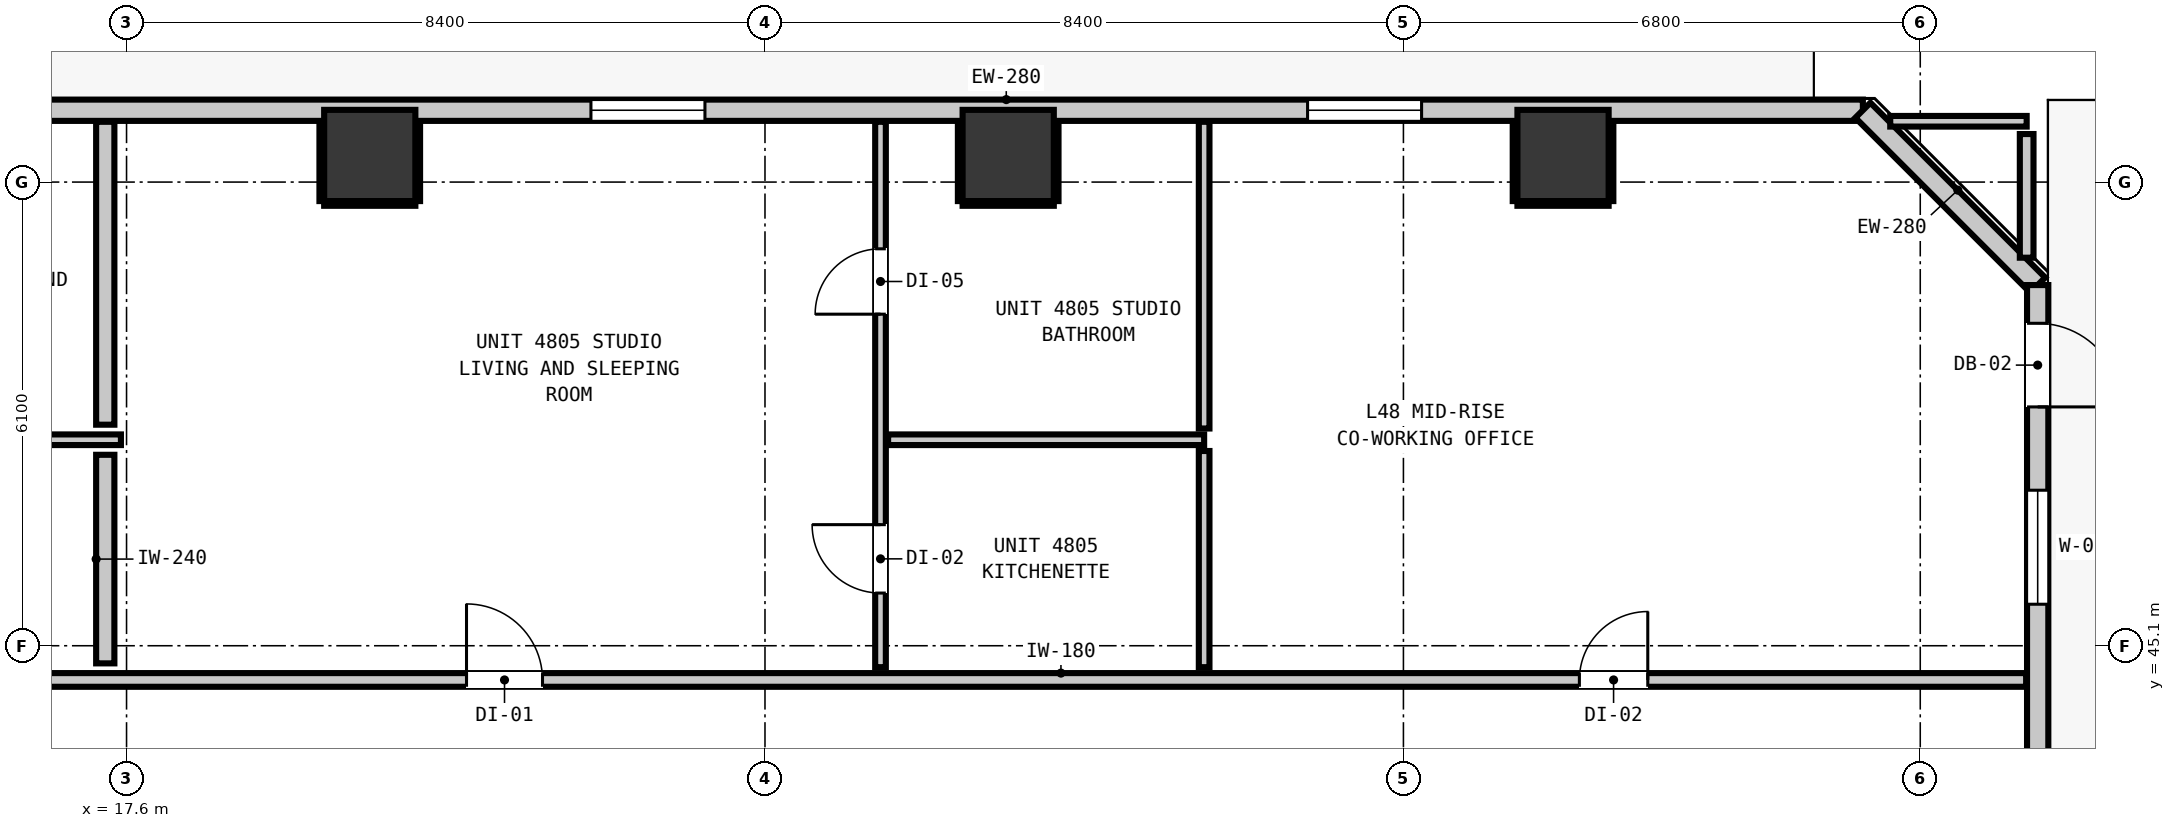
"""IFC4 building model, lengths in metres.
Left out: names, types, materials, properties, quantities, classifications, styles, units other than length and angle.
Written with IfcOpenShell. Run it as: python <this file> out.ifc"""

import sys

from ifc_helpers import new_model, si_unit, direction, frame, frame_2d, origin, origin_2d, place, context, subcontext, project, spatial, rectangle, extrude, element, fill, save


model = new_model("IFC4")
c1 = context("Model", 3, precision=1e-05, world=origin(), true_north=direction((0.0, 1.0)))
c2 = subcontext(c1, "Body", "Model", "MODEL_VIEW")
j1 = project(units=[si_unit("LENGTHUNIT", "METRE"), si_unit("PLANEANGLEUNIT", "RADIAN")], contexts=[c1])
p1 = place(None, origin())
s1 = spatial("IfcSite", under=j1, at=p1, CompositionType="ELEMENT")
p2 = place(p1, origin())
s2 = spatial("IfcBuilding", under=s1, at=p2, CompositionType="ELEMENT")
p3 = place(p2, frame((0.0, 0.0, 165.84)))
s3 = spatial("IfcBuildingStorey", under=s2, at=p3, CompositionType="ELEMENT", Elevation=165.84)
for number, where, z_axis, x_axis in (
    (1, (20.8, 51.55, -0.2), (0.0, 0.0, 1.0), (1.0, 0.0, 0.0)),
    (2, (29.2, 51.55, -0.2), (0.0, 0.0, 1.0), (1.0, 0.0, 0.0)),
    (3, (36.5, 51.55, -0.2), (0.0, 0.0, 1.0), (1.0, 0.0, 0.0)),
):
    element("IfcColumn", number, at=place(p3, frame(where, z_axis=z_axis, x_axis=x_axis)), inside=s3, PredefinedType="COLUMN", context=c2, shape_type="SweptSolid", body=[
        extrude(rectangle(XDim=1.2, YDim=1.2, at=origin_2d()), origin(), (0.0, 0.0, 1.0), 3.52),
    ])
p4 = place(p3, frame((5.355, 52.145, 0.0), z_axis=(0.0, 0.0, 1.0), x_axis=(1.0, 0.0, 0.0)))
e4 = element("IfcWall", 4, at=p4, inside=s3, PredefinedType="STANDARD", context=c2, shape_type="SweptSolid", body=[
    extrude(rectangle(XDim=35.09, YDim=0.28, at=frame_2d((17.545, 0.0))), origin(), (0.0, 0.0, 1.0), 3.08),
])
p5 = place(p4, frame((2.658, 0.0, 0.0)))
e5 = element("IfcOpeningElement", 5, at=p5, cuts=e4, PredefinedType="OPENING", context=c2, shape_type="SweptSolid", body=[
    extrude(rectangle(XDim=1.0, YDim=2.15, at=frame_2d((0.5, 1.075))), frame((0.0, 0.15, 0.0), z_axis=(0.0, -1.0, 0.0), x_axis=(1.0, 0.0, 0.0)), (0.0, 0.0, 1.0), 0.3),
])
p6 = place(p4, frame((4.362, 0.0, 0.85)))
e6 = element("IfcOpeningElement", 6, at=p6, cuts=e4, PredefinedType="OPENING", context=c2, shape_type="SweptSolid", body=[
    extrude(rectangle(XDim=1.5, YDim=1.8, at=frame_2d((0.75, 0.9))), frame((0.0, 0.15, 0.0), z_axis=(0.0, -1.0, 0.0), x_axis=(1.0, 0.0, 0.0)), (0.0, 0.0, 1.0), 0.3),
])
p7 = place(p4, frame((0.316, 0.0, 0.85)))
e7 = element("IfcOpeningElement", 7, at=p7, cuts=e4, PredefinedType="OPENING", context=c2, shape_type="SweptSolid", body=[
    extrude(rectangle(XDim=1.5, YDim=1.8, at=frame_2d((0.75, 0.9))), frame((0.0, 0.15, 0.0), z_axis=(0.0, -1.0, 0.0), x_axis=(1.0, 0.0, 0.0)), (0.0, 0.0, 1.0), 0.3),
])
p8 = place(p4, frame((9.608, 0.0, 0.85)))
e8 = element("IfcOpeningElement", 8, at=p8, cuts=e4, PredefinedType="OPENING", context=c2, shape_type="SweptSolid", body=[
    extrude(rectangle(XDim=1.5, YDim=1.8, at=frame_2d((0.75, 0.9))), frame((0.0, 0.15, 0.0), z_axis=(0.0, -1.0, 0.0), x_axis=(1.0, 0.0, 0.0)), (0.0, 0.0, 1.0), 0.3),
])
p9 = place(p4, frame((18.355, 0.0, 0.85)))
e9 = element("IfcOpeningElement", 9, at=p9, cuts=e4, PredefinedType="OPENING", context=c2, shape_type="SweptSolid", body=[
    extrude(rectangle(XDim=1.5, YDim=1.8, at=frame_2d((0.75, 0.9))), frame((0.0, 0.15, 0.0), z_axis=(0.0, -1.0, 0.0), x_axis=(1.0, 0.0, 0.0)), (0.0, 0.0, 1.0), 0.3),
])
p10 = place(p4, frame((27.784, 0.0, 0.85)))
e10 = element("IfcOpeningElement", 10, at=p10, cuts=e4, PredefinedType="OPENING", context=c2, shape_type="SweptSolid", body=[
    extrude(rectangle(XDim=1.5, YDim=1.8, at=frame_2d((0.75, 0.9))), frame((0.0, 0.15, 0.0), z_axis=(0.0, -1.0, 0.0), x_axis=(1.0, 0.0, 0.0)), (0.0, 0.0, 1.0), 0.3),
])
p11 = place(p3, frame((40.445, 52.145, 0.0), z_axis=(0.0, 0.0, 1.0), x_axis=(0.707106781187, -0.707106781187, 0.0)))
e11 = element("IfcWall", 11, at=p11, inside=s3, PredefinedType="STANDARD", context=c2, shape_type="SweptSolid", body=[
    extrude(rectangle(XDim=3.253, YDim=0.28, at=frame_2d((1.626, 0.0))), origin(), (0.0, 0.0, 1.0), 3.08),
])
p12 = place(p3, frame((42.745, 49.845, 0.0), z_axis=(0.0, 0.0, 1.0), x_axis=(0.0, -1.0, 0.0)))
e12 = element("IfcWall", 12, at=p12, inside=s3, PredefinedType="STANDARD", context=c2, shape_type="SweptSolid", body=[
    extrude(rectangle(XDim=32.29, YDim=0.28, at=frame_2d((16.145, 0.0))), origin(), (0.0, 0.0, 1.0), 3.08),
])
p13 = place(p12, frame((0.503, 0.0, 0.0)))
e13 = element("IfcOpeningElement", 13, at=p13, cuts=e12, PredefinedType="OPENING", context=c2, shape_type="SweptSolid", body=[
    extrude(rectangle(XDim=1.1, YDim=2.15, at=frame_2d((0.55, 1.075))), frame((0.0, 0.15, 0.0), z_axis=(0.0, -1.0, 0.0), x_axis=(1.0, 0.0, 0.0)), (0.0, 0.0, 1.0), 0.3),
])
p14 = place(p12, frame((2.699, 0.0, 0.85)))
e14 = element("IfcOpeningElement", 14, at=p14, cuts=e12, PredefinedType="OPENING", context=c2, shape_type="SweptSolid", body=[
    extrude(rectangle(XDim=1.5, YDim=1.8, at=frame_2d((0.75, 0.9))), frame((0.0, 0.15, 0.0), z_axis=(0.0, -1.0, 0.0), x_axis=(1.0, 0.0, 0.0)), (0.0, 0.0, 1.0), 0.3),
])
p15 = place(p12, frame((23.17, 0.0, 0.85)))
e15 = element("IfcOpeningElement", 15, at=p15, cuts=e12, PredefinedType="OPENING", context=c2, shape_type="SweptSolid", body=[
    extrude(rectangle(XDim=1.5, YDim=1.8, at=frame_2d((0.75, 0.9))), frame((0.0, 0.15, 0.0), z_axis=(0.0, -1.0, 0.0), x_axis=(1.0, 0.0, 0.0)), (0.0, 0.0, 1.0), 0.3),
])
p16 = place(p12, frame((13.62, 0.0, 0.85)))
e16 = element("IfcOpeningElement", 16, at=p16, cuts=e12, PredefinedType="OPENING", context=c2, shape_type="SweptSolid", body=[
    extrude(rectangle(XDim=1.5, YDim=1.8, at=frame_2d((0.75, 0.9))), frame((0.0, 0.15, 0.0), z_axis=(0.0, -1.0, 0.0), x_axis=(1.0, 0.0, 0.0)), (0.0, 0.0, 1.0), 0.3),
])
p17 = place(p3, frame((3.207, 44.65, 0.0), z_axis=(0.0, 0.0, 1.0), x_axis=(1.0, 0.0, 0.0)))
e17 = element("IfcWall", 17, at=p17, inside=s3, PredefinedType="PARTITIONING", context=c2, shape_type="SweptSolid", body=[
    extrude(rectangle(XDim=39.386, YDim=0.18, at=frame_2d((19.693, 0.0))), origin(), (0.0, 0.0, 1.0), 3.08),
])
p18 = place(p17, frame((5.952, 0.0, 0.0)))
e18 = element("IfcOpeningElement", 18, at=p18, cuts=e17, PredefinedType="OPENING", context=c2, shape_type="SweptSolid", body=[
    extrude(rectangle(XDim=1.0, YDim=2.15, at=frame_2d((0.5, 1.075))), frame((0.0, 0.1, 0.0), z_axis=(0.0, -1.0, 0.0), x_axis=(1.0, 0.0, 0.0)), (0.0, 0.0, 1.0), 0.2),
])
p19 = place(p17, frame((18.866, 0.0, 0.0)))
e19 = element("IfcOpeningElement", 19, at=p19, cuts=e17, PredefinedType="OPENING", context=c2, shape_type="SweptSolid", body=[
    extrude(rectangle(XDim=1.0, YDim=2.15, at=frame_2d((0.5, 1.075))), frame((0.0, 0.1, 0.0), z_axis=(0.0, -1.0, 0.0), x_axis=(1.0, 0.0, 0.0)), (0.0, 0.0, 1.0), 0.2),
])
p20 = place(p17, frame((33.508, 0.0, 0.0)))
e20 = element("IfcOpeningElement", 20, at=p20, cuts=e17, PredefinedType="OPENING", context=c2, shape_type="SweptSolid", body=[
    extrude(rectangle(XDim=0.9, YDim=2.1, at=frame_2d((0.45, 1.05))), frame((0.0, 0.1, 0.0), z_axis=(0.0, -1.0, 0.0), x_axis=(1.0, 0.0, 0.0)), (0.0, 0.0, 1.0), 0.2),
])
p21 = place(p3, frame((11.82, 47.81, 0.0), z_axis=(0.0, 0.0, 1.0), x_axis=(1.0, 0.0, 0.0)))
e21 = element("IfcWall", 21, at=p21, inside=s3, PredefinedType="PARTITIONING", context=c2, shape_type="SweptSolid", body=[
    extrude(rectangle(XDim=5.706, YDim=0.14, at=frame_2d((2.853, 0.0))), origin(), (0.0, 0.0, 1.0), 3.08),
])
p22 = place(p3, frame((27.62, 47.81, 0.0), z_axis=(0.0, 0.0, 1.0), x_axis=(1.0, 0.0, 0.0)))
e22 = element("IfcWall", 22, at=p22, inside=s3, PredefinedType="PARTITIONING", context=c2, shape_type="SweptSolid", body=[
    extrude(rectangle(XDim=4.158, YDim=0.14, at=frame_2d((2.079, 0.0))), origin(), (0.0, 0.0, 1.0), 3.08),
])
p23 = place(p3, frame((40.805, 52.0, 0.0), z_axis=(0.0, 0.0, 1.0), x_axis=(1.0, 0.0, 0.0)))
e23 = element("IfcWall", 23, at=p23, inside=s3, PredefinedType="PARTITIONING", context=c2, shape_type="SweptSolid", body=[
    extrude(rectangle(XDim=1.795, YDim=0.14, at=frame_2d((0.897, 0.0))), origin(), (0.0, 0.0, 1.0), 3.08),
])
p24 = place(p3, frame((17.32, 44.868, 0.0), z_axis=(0.0, 0.0, 1.0), x_axis=(0.0, 1.0, 0.0)))
e24 = element("IfcWall", 24, at=p24, inside=s3, PredefinedType="PARTITIONING", context=c2, shape_type="SweptSolid", body=[
    extrude(rectangle(XDim=2.744, YDim=0.24, at=frame_2d((1.372, 0.0))), origin(), (0.0, 0.0, 1.0), 3.08),
])
p25 = place(p3, frame((17.32, 48.008, 0.0), z_axis=(0.0, 0.0, 1.0), x_axis=(0.0, 1.0, 0.0)))
e25 = element("IfcWall", 25, at=p25, inside=s3, PredefinedType="PARTITIONING", context=c2, shape_type="SweptSolid", body=[
    extrude(rectangle(XDim=3.985, YDim=0.24, at=frame_2d((1.992, 0.0))), origin(), (0.0, 0.0, 1.0), 3.08),
])
p26 = place(p3, frame((42.6, 50.205, 0.0), z_axis=(0.0, 0.0, 1.0), x_axis=(0.0, 1.0, 0.0)))
e26 = element("IfcWall", 26, at=p26, inside=s3, PredefinedType="PARTITIONING", context=c2, shape_type="SweptSolid", body=[
    extrude(rectangle(XDim=1.627, YDim=0.18, at=frame_2d((0.813, 0.0))), origin(), (0.0, 0.0, 1.0), 3.08),
])
p27 = place(p3, frame((27.52, 44.818, 0.0), z_axis=(0.0, 0.0, 1.0), x_axis=(0.0, 1.0, 0.0)))
e27 = element("IfcWall", 27, at=p27, inside=s3, PredefinedType="PARTITIONING", context=c2, shape_type="SweptSolid", body=[
    extrude(rectangle(XDim=7.175, YDim=0.14, at=frame_2d((3.587, 0.0))), origin(), (0.0, 0.0, 1.0), 3.08),
])
p28 = place(p27, frame((0.975, 0.0, 0.0)))
e28 = element("IfcOpeningElement", 28, at=p28, cuts=e27, PredefinedType="OPENING", context=c2, shape_type="SweptSolid", body=[
    extrude(rectangle(XDim=0.9, YDim=2.1, at=frame_2d((0.45, 1.05))), frame((0.0, 0.08, 0.0), z_axis=(0.0, -1.0, 0.0), x_axis=(1.0, 0.0, 0.0)), (0.0, 0.0, 1.0), 0.16),
])
p29 = place(p27, frame((4.644, 0.0, 0.0)))
e29 = element("IfcOpeningElement", 29, at=p29, cuts=e27, PredefinedType="OPENING", context=c2, shape_type="SweptSolid", body=[
    extrude(rectangle(XDim=0.86, YDim=2.02, at=frame_2d((0.43, 1.01))), frame((0.0, 0.08, 0.0), z_axis=(0.0, -1.0, 0.0), x_axis=(1.0, 0.0, 0.0)), (0.0, 0.0, 1.0), 0.16),
])
p30 = place(p3, frame((31.778, 44.818, 0.0), z_axis=(0.0, 0.0, 1.0), x_axis=(0.0, 1.0, 0.0)))
e30 = element("IfcWall", 30, at=p30, inside=s3, PredefinedType="PARTITIONING", context=c2, shape_type="SweptSolid", body=[
    extrude(rectangle(XDim=2.844, YDim=0.14, at=frame_2d((1.422, 0.0))), origin(), (0.0, 0.0, 1.0), 3.08),
])
p31 = place(p3, frame((31.778, 47.958, 0.0), z_axis=(0.0, 0.0, 1.0), x_axis=(0.0, 1.0, 0.0)))
e31 = element("IfcWall", 31, at=p31, inside=s3, PredefinedType="PARTITIONING", context=c2, shape_type="SweptSolid", body=[
    extrude(rectangle(XDim=4.035, YDim=0.14, at=frame_2d((2.018, 0.0))), origin(), (0.0, 0.0, 1.0), 3.08),
])
p32 = place(p3, frame((20.2, 50.918, 0.0), z_axis=(0.0, 0.0, 1.0), x_axis=(1.0, 0.0, 0.0)))
e32 = element("IfcWall", 32, at=p32, inside=s3, PredefinedType="PARTITIONING", context=c2, shape_type="SweptSolid", body=[
    extrude(rectangle(XDim=1.2, YDim=0.06, at=frame_2d((0.6, 0.0))), origin(), (0.0, 0.0, 1.0), 1.45),
])
for number, where, z_axis, x_axis in (
    (33, (20.168, 50.95, 0.0), (0.0, 0.0, 1.0), (0.0, 1.0, 0.0)),
    (34, (21.432, 50.95, 0.0), (0.0, 0.0, 1.0), (0.0, 1.0, 0.0)),
):
    element("IfcWall", number, at=place(p3, frame(where, z_axis=z_axis, x_axis=x_axis)), inside=s3, PredefinedType="PARTITIONING", context=c2, shape_type="SweptSolid", body=[
        extrude(rectangle(XDim=1.04, YDim=0.06, at=frame_2d((0.52, 0.0))), origin(), (0.0, 0.0, 1.0), 1.45),
    ])
p33 = place(p3, frame((28.6, 50.918, 0.0), z_axis=(0.0, 0.0, 1.0), x_axis=(1.0, 0.0, 0.0)))
e35 = element("IfcWall", 35, at=p33, inside=s3, PredefinedType="PARTITIONING", context=c2, shape_type="SweptSolid", body=[
    extrude(rectangle(XDim=1.2, YDim=0.06, at=frame_2d((0.6, 0.0))), origin(), (0.0, 0.0, 1.0), 1.45),
])
for number, where, z_axis, x_axis in (
    (36, (28.568, 50.95, 0.0), (0.0, 0.0, 1.0), (0.0, 1.0, 0.0)),
    (37, (29.832, 50.95, 0.0), (0.0, 0.0, 1.0), (0.0, 1.0, 0.0)),
):
    element("IfcWall", number, at=place(p3, frame(where, z_axis=z_axis, x_axis=x_axis)), inside=s3, PredefinedType="PARTITIONING", context=c2, shape_type="SweptSolid", body=[
        extrude(rectangle(XDim=1.04, YDim=0.06, at=frame_2d((0.52, 0.0))), origin(), (0.0, 0.0, 1.0), 1.45),
    ])
p34 = place(p3, frame((35.9, 50.918, 0.0), z_axis=(0.0, 0.0, 1.0), x_axis=(1.0, 0.0, 0.0)))
e38 = element("IfcWall", 38, at=p34, inside=s3, PredefinedType="PARTITIONING", context=c2, shape_type="SweptSolid", body=[
    extrude(rectangle(XDim=1.2, YDim=0.06, at=frame_2d((0.6, 0.0))), origin(), (0.0, 0.0, 1.0), 1.45),
])
for number, where, z_axis, x_axis in (
    (39, (35.868, 50.95, 0.0), (0.0, 0.0, 1.0), (0.0, 1.0, 0.0)),
    (40, (37.132, 50.95, 0.0), (0.0, 0.0, 1.0), (0.0, 1.0, 0.0)),
):
    element("IfcWall", number, at=place(p3, frame(where, z_axis=z_axis, x_axis=x_axis)), inside=s3, PredefinedType="PARTITIONING", context=c2, shape_type="SweptSolid", body=[
        extrude(rectangle(XDim=1.04, YDim=0.06, at=frame_2d((0.52, 0.0))), origin(), (0.0, 0.0, 1.0), 1.45),
    ])
p35 = place(p13, origin())
e41 = element("IfcDoor", 41, at=p35, inside=s3, OperationType="SINGLE_SWING_RIGHT", PredefinedType="DOOR", context=c2, shape_type="SweptSolid", body=[
    extrude(rectangle(XDim=1.1, YDim=2.15, at=frame_2d((0.55, 1.075))), frame((0.0, 0.025, 0.0), z_axis=(0.0, -1.0, 0.0), x_axis=(1.0, 0.0, 0.0)), (0.0, 0.0, 1.0), 0.05),
])
fill(e13, e41)
p36 = place(p9, origin())
e42 = element("IfcWindow", 42, at=p36, inside=s3, PartitioningType="SINGLE_PANEL", PredefinedType="WINDOW", context=c2, shape_type="SweptSolid", body=[
    extrude(rectangle(XDim=1.5, YDim=1.8, at=frame_2d((0.75, 0.9))), frame((0.0, 0.03, 0.0), z_axis=(0.0, -1.0, 0.0), x_axis=(1.0, 0.0, 0.0)), (0.0, 0.0, 1.0), 0.06),
])
fill(e9, e42)
p37 = place(p10, origin())
e43 = element("IfcWindow", 43, at=p37, inside=s3, PartitioningType="SINGLE_PANEL", PredefinedType="WINDOW", context=c2, shape_type="SweptSolid", body=[
    extrude(rectangle(XDim=1.5, YDim=1.8, at=frame_2d((0.75, 0.9))), frame((0.0, 0.03, 0.0), z_axis=(0.0, -1.0, 0.0), x_axis=(1.0, 0.0, 0.0)), (0.0, 0.0, 1.0), 0.06),
])
fill(e10, e43)
p38 = place(p14, origin())
e44 = element("IfcWindow", 44, at=p38, inside=s3, PartitioningType="SINGLE_PANEL", PredefinedType="WINDOW", context=c2, shape_type="SweptSolid", body=[
    extrude(rectangle(XDim=1.5, YDim=1.8, at=frame_2d((0.75, 0.9))), frame((0.0, 0.03, 0.0), z_axis=(0.0, -1.0, 0.0), x_axis=(1.0, 0.0, 0.0)), (0.0, 0.0, 1.0), 0.06),
])
fill(e14, e44)
p39 = place(p19, origin())
e45 = element("IfcDoor", 45, at=p39, inside=s3, OperationType="SINGLE_SWING_LEFT", PredefinedType="DOOR", context=c2, shape_type="SweptSolid", body=[
    extrude(rectangle(XDim=1.0, YDim=2.15, at=frame_2d((0.5, 1.075))), frame((0.0, 0.025, 0.0), z_axis=(0.0, -1.0, 0.0), x_axis=(1.0, 0.0, 0.0)), (0.0, 0.0, 1.0), 0.05),
])
fill(e19, e45)
p40 = place(p28, origin())
e46 = element("IfcDoor", 46, at=p40, inside=s3, OperationType="SINGLE_SWING_RIGHT", PredefinedType="DOOR", context=c2, shape_type="SweptSolid", body=[
    extrude(rectangle(XDim=0.9, YDim=2.1, at=frame_2d((0.45, 1.05))), frame((0.0, 0.025, 0.0), z_axis=(0.0, -1.0, 0.0), x_axis=(1.0, 0.0, 0.0)), (0.0, 0.0, 1.0), 0.05),
])
fill(e28, e46)
p41 = place(p29, origin())
e47 = element("IfcDoor", 47, at=p41, inside=s3, OperationType="SINGLE_SWING_LEFT", PredefinedType="DOOR", context=c2, shape_type="SweptSolid", body=[
    extrude(rectangle(XDim=0.86, YDim=2.02, at=frame_2d((0.43, 1.01))), frame((0.0, 0.025, 0.0), z_axis=(0.0, -1.0, 0.0), x_axis=(1.0, 0.0, 0.0)), (0.0, 0.0, 1.0), 0.05),
])
fill(e29, e47)
p42 = place(p20, origin())
e48 = element("IfcDoor", 48, at=p42, inside=s3, OperationType="SINGLE_SWING_RIGHT", PredefinedType="DOOR", context=c2, shape_type="SweptSolid", body=[
    extrude(rectangle(XDim=0.9, YDim=2.1, at=frame_2d((0.45, 1.05))), frame((0.0, 0.025, 0.0), z_axis=(0.0, -1.0, 0.0), x_axis=(1.0, 0.0, 0.0)), (0.0, 0.0, 1.0), 0.05),
])
fill(e20, e48)
save(model, sys.argv[1])
